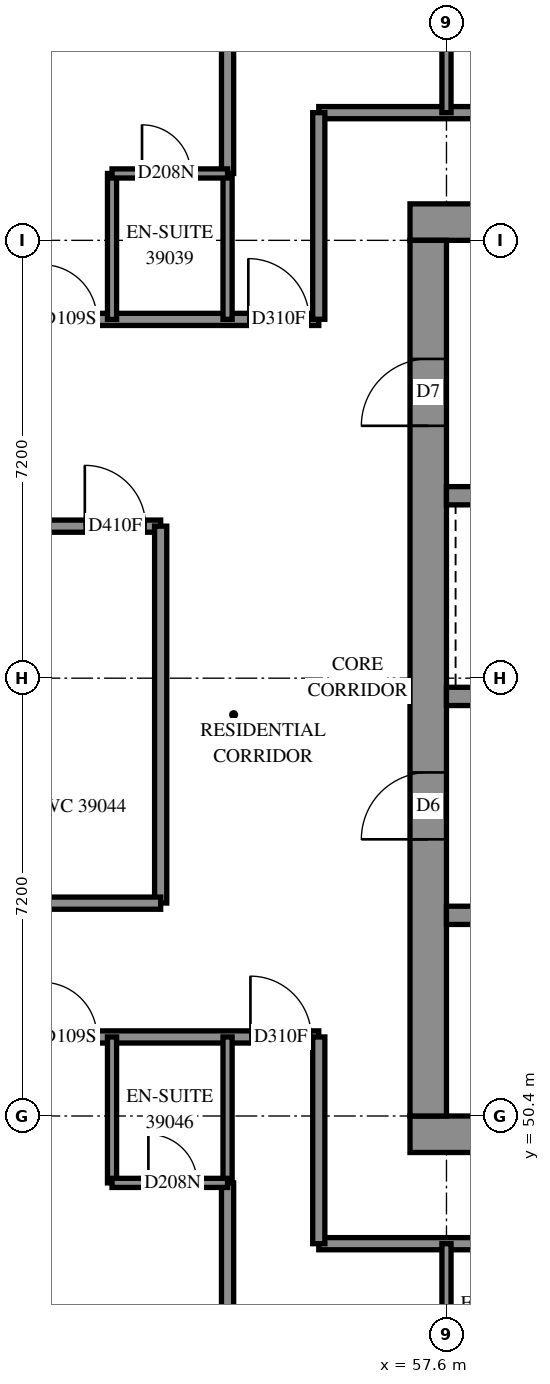
"""IFC4 building model, lengths in metres.
Left out: names, types, materials, properties, quantities, classifications, styles, units other than length and angle.
Written with IfcOpenShell. Run it as: python <this file> out.ifc"""

import sys

from ifc_helpers import new_model, si_unit, direction, frame, frame_2d, origin, place, context, subcontext, project, spatial, rectangle, extrude, element, fill, save


model = new_model("IFC4")
c1 = context("Model", 3, precision=1e-05, world=origin(), true_north=direction((0.0, 1.0)))
c2 = subcontext(c1, "Body", "Model", "MODEL_VIEW")
j1 = project(units=[si_unit("LENGTHUNIT", "METRE"), si_unit("PLANEANGLEUNIT", "RADIAN")], contexts=[c1])
p1 = place(None, origin())
s1 = spatial("IfcSite", under=j1, at=p1, CompositionType="ELEMENT")
p2 = place(p1, origin())
s2 = spatial("IfcBuilding", under=s1, at=p2, CompositionType="ELEMENT")
p3 = place(p2, frame((0.0, 0.0, 145.6)))
s3 = spatial("IfcBuildingStorey", under=s2, at=p3, CompositionType="ELEMENT", Elevation=145.6)
p4 = place(p3, frame((57.0, 50.1, -0.3), z_axis=(0.0, 0.0, 1.0), x_axis=(1.0, 0.0, 0.0)))
e1 = element("IfcWall", 1, at=p4, inside=s3, PredefinedType="SHEAR", context=c2, shape_type="SweptSolid", body=[
    extrude(rectangle(XDim=15.6, YDim=0.6, at=frame_2d((7.8, 0.0))), origin(), (0.0, 0.0, 1.0), 2.7),
])
p5 = place(p3, frame((57.0, 65.1, -0.3), z_axis=(0.0, 0.0, 1.0), x_axis=(1.0, 0.0, 0.0)))
e2 = element("IfcWall", 2, at=p5, inside=s3, PredefinedType="SHEAR", context=c2, shape_type="SweptSolid", body=[
    extrude(rectangle(XDim=15.6, YDim=0.6, at=frame_2d((7.8, 0.0))), origin(), (0.0, 0.0, 1.0), 2.7),
])
p6 = place(p5, frame((10.6, 0.0, 0.3)))
e3 = element("IfcOpeningElement", 3, at=p6, cuts=e2, PredefinedType="OPENING", context=c2, shape_type="SweptSolid", body=[
    extrude(rectangle(XDim=0.8, YDim=2.1, at=frame_2d((0.4, 1.05))), frame((0.0, 0.31, 0.0), z_axis=(0.0, -1.0, 0.0), x_axis=(1.0, 0.0, 0.0)), (0.0, 0.0, 1.0), 0.62),
])
p7 = place(p3, frame((57.3, 50.4, -0.3), z_axis=(0.0, 0.0, 1.0), x_axis=(0.0, 1.0, 0.0)))
e4 = element("IfcWall", 4, at=p7, inside=s3, PredefinedType="SHEAR", context=c2, shape_type="SweptSolid", body=[
    extrude(rectangle(XDim=14.4, YDim=0.6, at=frame_2d((7.2, 0.0))), origin(), (0.0, 0.0, 1.0), 2.7),
])
p8 = place(p7, frame((4.55, 0.0, 0.3)))
e5 = element("IfcOpeningElement", 5, at=p8, cuts=e4, PredefinedType="OPENING", context=c2, shape_type="SweptSolid", body=[
    extrude(rectangle(XDim=1.1, YDim=2.1, at=frame_2d((0.55, 1.05))), frame((0.0, 0.31, 0.0), z_axis=(0.0, -1.0, 0.0), x_axis=(1.0, 0.0, 0.0)), (0.0, 0.0, 1.0), 0.62),
])
p9 = place(p7, frame((11.35, 0.0, 0.3)))
e6 = element("IfcOpeningElement", 6, at=p9, cuts=e4, PredefinedType="OPENING", context=c2, shape_type="SweptSolid", body=[
    extrude(rectangle(XDim=1.1, YDim=2.1, at=frame_2d((0.55, 1.05))), frame((0.0, 0.31, 0.0), z_axis=(0.0, -1.0, 0.0), x_axis=(1.0, 0.0, 0.0)), (0.0, 0.0, 1.0), 0.62),
])
p10 = place(p3, frame((57.6, 53.7, 0.0), z_axis=(0.0, 0.0, 1.0), x_axis=(1.0, 0.0, 0.0)))
e7 = element("IfcWall", 7, at=p10, inside=s3, PredefinedType="SOLIDWALL", context=c2, shape_type="SweptSolid", body=[
    extrude(rectangle(XDim=14.4, YDim=0.3, at=frame_2d((7.2, 0.0))), origin(), (0.0, 0.0, 1.0), 3.1),
])
p11 = place(p10, frame((1.35, 0.0, 0.0)))
e8 = element("IfcOpeningElement", 8, at=p11, cuts=e7, PredefinedType="OPENING", context=c2, shape_type="SweptSolid", body=[
    extrude(rectangle(XDim=0.9, YDim=2.1, at=frame_2d((0.45, 1.05))), frame((0.0, 0.16, 0.0), z_axis=(0.0, -1.0, 0.0), x_axis=(1.0, 0.0, 0.0)), (0.0, 0.0, 1.0), 0.32),
])
p12 = place(p10, frame((4.95, 0.0, 0.0)))
e9 = element("IfcOpeningElement", 9, at=p12, cuts=e7, PredefinedType="OPENING", context=c2, shape_type="SweptSolid", body=[
    extrude(rectangle(XDim=0.9, YDim=2.1, at=frame_2d((0.45, 1.05))), frame((0.0, 0.16, 0.0), z_axis=(0.0, -1.0, 0.0), x_axis=(1.0, 0.0, 0.0)), (0.0, 0.0, 1.0), 0.32),
])
p13 = place(p10, frame((8.55, 0.0, 0.0)))
e10 = element("IfcOpeningElement", 10, at=p13, cuts=e7, PredefinedType="OPENING", context=c2, shape_type="SweptSolid", body=[
    extrude(rectangle(XDim=0.9, YDim=2.1, at=frame_2d((0.45, 1.05))), frame((0.0, 0.16, 0.0), z_axis=(0.0, -1.0, 0.0), x_axis=(1.0, 0.0, 0.0)), (0.0, 0.0, 1.0), 0.32),
])
p14 = place(p10, frame((12.05, 0.0, 0.0)))
e11 = element("IfcOpeningElement", 11, at=p14, cuts=e7, PredefinedType="OPENING", context=c2, shape_type="SweptSolid", body=[
    extrude(rectangle(XDim=1.1, YDim=2.1, at=frame_2d((0.55, 1.05))), frame((0.0, 0.16, 0.0), z_axis=(0.0, -1.0, 0.0), x_axis=(1.0, 0.0, 0.0)), (0.0, 0.0, 1.0), 0.32),
])
p15 = place(p3, frame((57.6, 57.3, 0.0), z_axis=(0.0, 0.0, 1.0), x_axis=(1.0, 0.0, 0.0)))
e12 = element("IfcWall", 12, at=p15, inside=s3, PredefinedType="SOLIDWALL", context=c2, shape_type="SweptSolid", body=[
    extrude(rectangle(XDim=14.4, YDim=0.3, at=frame_2d((7.2, 0.0))), origin(), (0.0, 0.0, 1.0), 3.1),
])
p16 = place(p15, frame((1.25, 0.0, 0.0)))
e13 = element("IfcOpeningElement", 13, at=p16, cuts=e12, PredefinedType="OPENING", context=c2, shape_type="SweptSolid", body=[
    extrude(rectangle(XDim=1.1, YDim=2.1, at=frame_2d((0.55, 1.05))), frame((0.0, 0.16, 0.0), z_axis=(0.0, -1.0, 0.0), x_axis=(1.0, 0.0, 0.0)), (0.0, 0.0, 1.0), 0.32),
])
p17 = place(p15, frame((4.85, 0.0, 0.0)))
e14 = element("IfcOpeningElement", 14, at=p17, cuts=e12, PredefinedType="OPENING", context=c2, shape_type="SweptSolid", body=[
    extrude(rectangle(XDim=1.1, YDim=2.1, at=frame_2d((0.55, 1.05))), frame((0.0, 0.16, 0.0), z_axis=(0.0, -1.0, 0.0), x_axis=(1.0, 0.0, 0.0)), (0.0, 0.0, 1.0), 0.32),
])
p18 = place(p15, frame((8.45, 0.0, 0.0)))
e15 = element("IfcOpeningElement", 15, at=p18, cuts=e12, PredefinedType="OPENING", context=c2, shape_type="SweptSolid", body=[
    extrude(rectangle(XDim=1.1, YDim=2.1, at=frame_2d((0.55, 1.05))), frame((0.0, 0.16, 0.0), z_axis=(0.0, -1.0, 0.0), x_axis=(1.0, 0.0, 0.0)), (0.0, 0.0, 1.0), 0.32),
])
p19 = place(p15, frame((12.05, 0.0, 0.0)))
e16 = element("IfcOpeningElement", 16, at=p19, cuts=e12, PredefinedType="OPENING", context=c2, shape_type="SweptSolid", body=[
    extrude(rectangle(XDim=1.1, YDim=2.1, at=frame_2d((0.55, 1.05))), frame((0.0, 0.16, 0.0), z_axis=(0.0, -1.0, 0.0), x_axis=(1.0, 0.0, 0.0)), (0.0, 0.0, 1.0), 0.32),
])
p20 = place(p3, frame((57.6, 60.6, 0.0), z_axis=(0.0, 0.0, 1.0), x_axis=(1.0, 0.0, 0.0)))
e17 = element("IfcWall", 17, at=p20, inside=s3, PredefinedType="SOLIDWALL", context=c2, shape_type="SweptSolid", body=[
    extrude(rectangle(XDim=7.2, YDim=0.3, at=frame_2d((3.6, 0.0))), origin(), (0.0, 0.0, 1.0), 3.1),
])
p21 = place(p3, frame((55.5, 48.3, 0.0), z_axis=(0.0, 0.0, 1.0), x_axis=(1.0, 0.0, 0.0)))
e18 = element("IfcWall", 18, at=p21, inside=s3, PredefinedType="PARTITIONING", context=c2, shape_type="SweptSolid", body=[
    extrude(rectangle(XDim=18.974, YDim=0.2, at=frame_2d((9.487, 0.0))), origin(), (0.0, 0.0, 1.0), 3.1),
])
p22 = place(p21, frame((4.4, 0.0, 0.0)))
e19 = element("IfcOpeningElement", 19, at=p22, cuts=e18, PredefinedType="OPENING", context=c2, shape_type="SweptSolid", body=[
    extrude(rectangle(XDim=0.9, YDim=2.1, at=frame_2d((0.45, 1.05))), frame((0.0, 0.11, 0.0), z_axis=(0.0, -1.0, 0.0), x_axis=(1.0, 0.0, 0.0)), (0.0, 0.0, 1.0), 0.22),
])
p23 = place(p21, frame((6.1, 0.0, 0.0)))
e20 = element("IfcOpeningElement", 20, at=p23, cuts=e18, PredefinedType="OPENING", context=c2, shape_type="SweptSolid", body=[
    extrude(rectangle(XDim=0.9, YDim=2.1, at=frame_2d((0.45, 1.05))), frame((0.0, 0.11, 0.0), z_axis=(0.0, -1.0, 0.0), x_axis=(1.0, 0.0, 0.0)), (0.0, 0.0, 1.0), 0.22),
])
p24 = place(p21, frame((13.162, 0.0, 0.0)))
e21 = element("IfcOpeningElement", 21, at=p24, cuts=e18, PredefinedType="OPENING", context=c2, shape_type="SweptSolid", body=[
    extrude(rectangle(XDim=1.0, YDim=2.1, at=frame_2d((0.5, 1.05))), frame((0.0, 0.11, 0.0), z_axis=(0.0, -1.0, 0.0), x_axis=(1.0, 0.0, 0.0)), (0.0, 0.0, 1.0), 0.22),
])
p25 = place(p3, frame((55.5, 66.9, 0.0), z_axis=(0.0, 0.0, 1.0), x_axis=(1.0, 0.0, 0.0)))
e22 = element("IfcWall", 22, at=p25, inside=s3, PredefinedType="PARTITIONING", context=c2, shape_type="SweptSolid", body=[
    extrude(rectangle(XDim=18.6, YDim=0.2, at=frame_2d((9.3, 0.0))), origin(), (0.0, 0.0, 1.0), 3.1),
])
p26 = place(p25, frame((4.4, 0.0, 0.0)))
e23 = element("IfcOpeningElement", 23, at=p26, cuts=e22, PredefinedType="OPENING", context=c2, shape_type="SweptSolid", body=[
    extrude(rectangle(XDim=0.9, YDim=2.1, at=frame_2d((0.45, 1.05))), frame((0.0, 0.11, 0.0), z_axis=(0.0, -1.0, 0.0), x_axis=(1.0, 0.0, 0.0)), (0.0, 0.0, 1.0), 0.22),
])
p27 = place(p25, frame((6.1, 0.0, 0.0)))
e24 = element("IfcOpeningElement", 24, at=p27, cuts=e22, PredefinedType="OPENING", context=c2, shape_type="SweptSolid", body=[
    extrude(rectangle(XDim=0.9, YDim=2.1, at=frame_2d((0.45, 1.05))), frame((0.0, 0.11, 0.0), z_axis=(0.0, -1.0, 0.0), x_axis=(1.0, 0.0, 0.0)), (0.0, 0.0, 1.0), 0.22),
])
p28 = place(p25, frame((11.65, 0.0, 0.0)))
e25 = element("IfcOpeningElement", 25, at=p28, cuts=e22, PredefinedType="OPENING", context=c2, shape_type="SweptSolid", body=[
    extrude(rectangle(XDim=0.9, YDim=2.1, at=frame_2d((0.45, 1.05))), frame((0.0, 0.11, 0.0), z_axis=(0.0, -1.0, 0.0), x_axis=(1.0, 0.0, 0.0)), (0.0, 0.0, 1.0), 0.22),
])
p29 = place(p25, frame((13.3, 0.0, 0.0)))
e26 = element("IfcOpeningElement", 26, at=p29, cuts=e22, PredefinedType="OPENING", context=c2, shape_type="SweptSolid", body=[
    extrude(rectangle(XDim=0.9, YDim=2.1, at=frame_2d((0.45, 1.05))), frame((0.0, 0.11, 0.0), z_axis=(0.0, -1.0, 0.0), x_axis=(1.0, 0.0, 0.0)), (0.0, 0.0, 1.0), 0.22),
])
p30 = place(p3, frame((36.0, 60.1, 0.0), z_axis=(0.0, 0.0, 1.0), x_axis=(1.0, 0.0, 0.0)))
e27 = element("IfcWall", 27, at=p30, inside=s3, PredefinedType="PARTITIONING", context=c2, shape_type="SweptSolid", body=[
    extrude(rectangle(XDim=16.9, YDim=0.2, at=frame_2d((8.45, 0.0))), origin(), (0.0, 0.0, 1.0), 3.1),
])
p31 = place(p30, frame((4.125, 0.0, 0.0)))
e28 = element("IfcOpeningElement", 28, at=p31, cuts=e27, PredefinedType="OPENING", context=c2, shape_type="SweptSolid", body=[
    extrude(rectangle(XDim=1.0, YDim=2.1, at=frame_2d((0.5, 1.05))), frame((0.0, 0.11, 0.0), z_axis=(0.0, -1.0, 0.0), x_axis=(1.0, 0.0, 0.0)), (0.0, 0.0, 1.0), 0.22),
])
p32 = place(p30, frame((7.6, 0.0, 0.0)))
e29 = element("IfcOpeningElement", 29, at=p32, cuts=e27, PredefinedType="OPENING", context=c2, shape_type="SweptSolid", body=[
    extrude(rectangle(XDim=0.9, YDim=2.1, at=frame_2d((0.45, 1.05))), frame((0.0, 0.11, 0.0), z_axis=(0.0, -1.0, 0.0), x_axis=(1.0, 0.0, 0.0)), (0.0, 0.0, 1.0), 0.22),
])
p33 = place(p30, frame((11.635, 0.0, 0.0)))
e30 = element("IfcOpeningElement", 30, at=p33, cuts=e27, PredefinedType="OPENING", context=c2, shape_type="SweptSolid", body=[
    extrude(rectangle(XDim=1.0, YDim=2.1, at=frame_2d((0.5, 1.05))), frame((0.0, 0.11, 0.0), z_axis=(0.0, -1.0, 0.0), x_axis=(1.0, 0.0, 0.0)), (0.0, 0.0, 1.0), 0.22),
])
p34 = place(p30, frame((15.652, 0.0, 0.0)))
e31 = element("IfcOpeningElement", 31, at=p34, cuts=e27, PredefinedType="OPENING", context=c2, shape_type="SweptSolid", body=[
    extrude(rectangle(XDim=1.0, YDim=2.1, at=frame_2d((0.5, 1.05))), frame((0.0, 0.11, 0.0), z_axis=(0.0, -1.0, 0.0), x_axis=(1.0, 0.0, 0.0)), (0.0, 0.0, 1.0), 0.22),
])
p35 = place(p3, frame((54.0, 42.345, 0.0), z_axis=(0.0, 0.0, 1.0), x_axis=(0.0, 1.0, 0.0)))
e32 = element("IfcWall", 32, at=p35, inside=s3, PredefinedType="PARTITIONING", context=c2, shape_type="SweptSolid", body=[
    extrude(rectangle(XDim=6.955, YDim=0.2, at=frame_2d((3.477, 0.0))), origin(), (0.0, 0.0, 1.0), 3.1),
])
p36 = place(p3, frame((54.0, 65.9, 0.0), z_axis=(0.0, 0.0, 1.0), x_axis=(0.0, 1.0, 0.0)))
e33 = element("IfcWall", 33, at=p36, inside=s3, PredefinedType="PARTITIONING", context=c2, shape_type="SweptSolid", body=[
    extrude(rectangle(XDim=6.843, YDim=0.2, at=frame_2d((3.422, 0.0))), origin(), (0.0, 0.0, 1.0), 3.1),
])
p37 = place(p3, frame((52.9, 53.902, 0.0), z_axis=(0.0, 0.0, 1.0), x_axis=(0.0, 1.0, 0.0)))
e34 = element("IfcWall", 34, at=p37, inside=s3, PredefinedType="PARTITIONING", context=c2, shape_type="SweptSolid", body=[
    extrude(rectangle(XDim=6.198, YDim=0.2, at=frame_2d((3.099, 0.0))), origin(), (0.0, 0.0, 1.0), 3.1),
])
p38 = place(p3, frame((50.4, 51.7, 0.0), z_axis=(0.0, 0.0, 1.0), x_axis=(1.0, 0.0, 0.0)))
e35 = element("IfcWall", 35, at=p38, inside=s3, PredefinedType="PARTITIONING", context=c2, shape_type="SweptSolid", body=[
    extrude(rectangle(XDim=5.1, YDim=0.2, at=frame_2d((2.55, 0.0))), origin(), (0.0, 0.0, 1.0), 3.1),
])
p39 = place(p38, frame((0.552, 0.0, 0.0)))
e36 = element("IfcOpeningElement", 36, at=p39, cuts=e35, PredefinedType="OPENING", context=c2, shape_type="SweptSolid", body=[
    extrude(rectangle(XDim=0.9, YDim=2.1, at=frame_2d((0.45, 1.05))), frame((0.0, 0.11, 0.0), z_axis=(0.0, -1.0, 0.0), x_axis=(1.0, 0.0, 0.0)), (0.0, 0.0, 1.0), 0.22),
])
p40 = place(p38, frame((3.976, 0.0, 0.0)))
e37 = element("IfcOpeningElement", 37, at=p40, cuts=e35, PredefinedType="OPENING", context=c2, shape_type="SweptSolid", body=[
    extrude(rectangle(XDim=1.0, YDim=2.1, at=frame_2d((0.5, 1.05))), frame((0.0, 0.11, 0.0), z_axis=(0.0, -1.0, 0.0), x_axis=(1.0, 0.0, 0.0)), (0.0, 0.0, 1.0), 0.22),
])
p41 = place(p3, frame((50.4, 63.5, 0.0), z_axis=(0.0, 0.0, 1.0), x_axis=(1.0, 0.0, 0.0)))
e38 = element("IfcWall", 38, at=p41, inside=s3, PredefinedType="PARTITIONING", context=c2, shape_type="SweptSolid", body=[
    extrude(rectangle(XDim=5.1, YDim=0.2, at=frame_2d((2.55, 0.0))), origin(), (0.0, 0.0, 1.0), 3.1),
])
p42 = place(p41, frame((0.552, 0.0, 0.0)))
e39 = element("IfcOpeningElement", 39, at=p42, cuts=e38, PredefinedType="OPENING", context=c2, shape_type="SweptSolid", body=[
    extrude(rectangle(XDim=0.9, YDim=2.1, at=frame_2d((0.45, 1.05))), frame((0.0, 0.11, 0.0), z_axis=(0.0, -1.0, 0.0), x_axis=(1.0, 0.0, 0.0)), (0.0, 0.0, 1.0), 0.22),
])
p43 = place(p41, frame((3.941, 0.0, 0.0)))
e40 = element("IfcOpeningElement", 40, at=p43, cuts=e38, PredefinedType="OPENING", context=c2, shape_type="SweptSolid", body=[
    extrude(rectangle(XDim=1.0, YDim=2.1, at=frame_2d((0.5, 1.05))), frame((0.0, 0.11, 0.0), z_axis=(0.0, -1.0, 0.0), x_axis=(1.0, 0.0, 0.0)), (0.0, 0.0, 1.0), 0.22),
])
p44 = place(p3, frame((55.5, 48.3, 0.0), z_axis=(0.0, 0.0, 1.0), x_axis=(0.0, 1.0, 0.0)))
e41 = element("IfcWall", 41, at=p44, inside=s3, PredefinedType="PARTITIONING", context=c2, shape_type="SweptSolid", body=[
    extrude(rectangle(XDim=3.4, YDim=0.2, at=frame_2d((1.7, 0.0))), origin(), (0.0, 0.0, 1.0), 3.1),
])
p45 = place(p3, frame((55.5, 63.502, 0.0), z_axis=(0.0, 0.0, 1.0), x_axis=(0.0, 1.0, 0.0)))
e42 = element("IfcWall", 42, at=p45, inside=s3, PredefinedType="PARTITIONING", context=c2, shape_type="SweptSolid", body=[
    extrude(rectangle(XDim=3.398, YDim=0.2, at=frame_2d((1.699, 0.0))), origin(), (0.0, 0.0, 1.0), 3.1),
])
p46 = place(p3, frame((50.4, 53.9, 0.0), z_axis=(0.0, 0.0, 1.0), x_axis=(1.0, 0.0, 0.0)))
e43 = element("IfcWall", 43, at=p46, inside=s3, PredefinedType="PARTITIONING", context=c2, shape_type="SweptSolid", body=[
    extrude(rectangle(XDim=2.5, YDim=0.2, at=frame_2d((1.25, 0.0))), origin(), (0.0, 0.0, 1.0), 3.1),
])
for number, where, z_axis, x_axis in (
    (44, (52.1, 49.3, 0.0), (0.0, 0.0, 1.0), (0.0, 1.0, 0.0)),
    (45, (52.1, 63.5, 0.0), (0.0, 0.0, 1.0), (0.0, 1.0, 0.0)),
    (46, (54.0, 49.3, 0.0), (0.0, 0.0, 1.0), (0.0, 1.0, 0.0)),
    (47, (54.0, 63.5, 0.0), (0.0, 0.0, 1.0), (0.0, 1.0, 0.0)),
    (48, (57.6, 45.9, 0.0), (0.0, 0.0, 1.0), (0.0, 1.0, 0.0)),
    (49, (57.6, 66.9, 0.0), (0.0, 0.0, 1.0), (0.0, 1.0, 0.0)),
):
    element("IfcWall", number, at=place(p3, frame(where, z_axis=z_axis, x_axis=x_axis)), inside=s3, PredefinedType="PARTITIONING", context=c2, shape_type="SweptSolid", body=[
        extrude(rectangle(XDim=2.4, YDim=0.15, at=frame_2d((1.2, 0.0))), origin(), (0.0, 0.0, 1.0), 3.1),
    ])
p47 = place(p3, frame((52.1, 49.3, 0.0), z_axis=(0.0, 0.0, 1.0), x_axis=(1.0, 0.0, 0.0)))
e50 = element("IfcWall", 50, at=p47, inside=s3, PredefinedType="PARTITIONING", context=c2, shape_type="SweptSolid", body=[
    extrude(rectangle(XDim=1.9, YDim=0.15, at=frame_2d((0.95, 0.0))), origin(), (0.0, 0.0, 1.0), 3.1),
])
p48 = place(p47, frame((0.598, 0.0, 0.0)))
e51 = element("IfcOpeningElement", 51, at=p48, cuts=e50, PredefinedType="OPENING", context=c2, shape_type="SweptSolid", body=[
    extrude(rectangle(XDim=0.8, YDim=2.1, at=frame_2d((0.4, 1.05))), frame((0.0, 0.085, 0.0), z_axis=(0.0, -1.0, 0.0), x_axis=(1.0, 0.0, 0.0)), (0.0, 0.0, 1.0), 0.17),
])
p49 = place(p3, frame((52.1, 65.9, 0.0), z_axis=(0.0, 0.0, 1.0), x_axis=(1.0, 0.0, 0.0)))
e52 = element("IfcWall", 52, at=p49, inside=s3, PredefinedType="PARTITIONING", context=c2, shape_type="SweptSolid", body=[
    extrude(rectangle(XDim=1.9, YDim=0.15, at=frame_2d((0.95, 0.0))), origin(), (0.0, 0.0, 1.0), 3.1),
])
p50 = place(p49, frame((0.493, 0.0, 0.0)))
e53 = element("IfcOpeningElement", 53, at=p50, cuts=e52, PredefinedType="OPENING", context=c2, shape_type="SweptSolid", body=[
    extrude(rectangle(XDim=0.8, YDim=2.1, at=frame_2d((0.4, 1.05))), frame((0.0, 0.085, 0.0), z_axis=(0.0, -1.0, 0.0), x_axis=(1.0, 0.0, 0.0)), (0.0, 0.0, 1.0), 0.17),
])
p51 = place(p8, origin())
e54 = element("IfcDoor", 54, at=p51, inside=s3, OperationType="DOUBLE_DOOR_SINGLE_SWING", PredefinedType="DOOR", context=c2, shape_type="SweptSolid", body=[
    extrude(rectangle(XDim=1.1, YDim=2.1, at=frame_2d((0.55, 1.05))), frame((0.0, 0.025, 0.0), z_axis=(0.0, -1.0, 0.0), x_axis=(1.0, 0.0, 0.0)), (0.0, 0.0, 1.0), 0.05),
])
fill(e5, e54)
p52 = place(p9, origin())
e55 = element("IfcDoor", 55, at=p52, inside=s3, OperationType="SINGLE_SWING_LEFT", PredefinedType="DOOR", context=c2, shape_type="SweptSolid", body=[
    extrude(rectangle(XDim=1.1, YDim=2.1, at=frame_2d((0.55, 1.05))), frame((0.0, 0.025, 0.0), z_axis=(0.0, -1.0, 0.0), x_axis=(1.0, 0.0, 0.0)), (0.0, 0.0, 1.0), 0.05),
])
fill(e6, e55)
p53 = place(p42, origin())
e56 = element("IfcDoor", 56, at=p53, inside=s3, OperationType="SINGLE_SWING_RIGHT", PredefinedType="DOOR", context=c2, shape_type="SweptSolid", body=[
    extrude(rectangle(XDim=0.9, YDim=2.1, at=frame_2d((0.45, 1.05))), frame((0.0, 0.025, 0.0), z_axis=(0.0, -1.0, 0.0), x_axis=(1.0, 0.0, 0.0)), (0.0, 0.0, 1.0), 0.05),
])
fill(e39, e56)
p54 = place(p50, origin())
e57 = element("IfcDoor", 57, at=p54, inside=s3, OperationType="SINGLE_SWING_RIGHT", PredefinedType="DOOR", context=c2, shape_type="SweptSolid", body=[
    extrude(rectangle(XDim=0.8, YDim=2.1, at=frame_2d((0.4, 1.05))), frame((0.0, 0.025, 0.0), z_axis=(0.0, -1.0, 0.0), x_axis=(1.0, 0.0, 0.0)), (0.0, 0.0, 1.0), 0.05),
])
fill(e53, e57)
p55 = place(p43, origin())
e58 = element("IfcDoor", 58, at=p55, inside=s3, OperationType="SINGLE_SWING_LEFT", PredefinedType="DOOR", context=c2, shape_type="SweptSolid", body=[
    extrude(rectangle(XDim=1.0, YDim=2.1, at=frame_2d((0.5, 1.05))), frame((0.0, 0.025, 0.0), z_axis=(0.0, -1.0, 0.0), x_axis=(1.0, 0.0, 0.0)), (0.0, 0.0, 1.0), 0.05),
])
fill(e40, e58)
p56 = place(p34, origin())
e59 = element("IfcDoor", 59, at=p56, inside=s3, OperationType="SINGLE_SWING_LEFT", PredefinedType="DOOR", context=c2, shape_type="SweptSolid", body=[
    extrude(rectangle(XDim=1.0, YDim=2.1, at=frame_2d((0.5, 1.05))), frame((0.0, 0.025, 0.0), z_axis=(0.0, -1.0, 0.0), x_axis=(1.0, 0.0, 0.0)), (0.0, 0.0, 1.0), 0.05),
])
fill(e31, e59)
p57 = place(p39, origin())
e60 = element("IfcDoor", 60, at=p57, inside=s3, OperationType="SINGLE_SWING_LEFT", PredefinedType="DOOR", context=c2, shape_type="SweptSolid", body=[
    extrude(rectangle(XDim=0.9, YDim=2.1, at=frame_2d((0.45, 1.05))), frame((0.0, 0.025, 0.0), z_axis=(0.0, -1.0, 0.0), x_axis=(1.0, 0.0, 0.0)), (0.0, 0.0, 1.0), 0.05),
])
fill(e36, e60)
p58 = place(p48, origin())
e61 = element("IfcDoor", 61, at=p58, inside=s3, OperationType="SINGLE_SWING_RIGHT", PredefinedType="DOOR", context=c2, shape_type="SweptSolid", body=[
    extrude(rectangle(XDim=0.8, YDim=2.1, at=frame_2d((0.4, 1.05))), frame((0.0, 0.025, 0.0), z_axis=(0.0, -1.0, 0.0), x_axis=(1.0, 0.0, 0.0)), (0.0, 0.0, 1.0), 0.05),
])
fill(e51, e61)
p59 = place(p40, origin())
e62 = element("IfcDoor", 62, at=p59, inside=s3, OperationType="SINGLE_SWING_RIGHT", PredefinedType="DOOR", context=c2, shape_type="SweptSolid", body=[
    extrude(rectangle(XDim=1.0, YDim=2.1, at=frame_2d((0.5, 1.05))), frame((0.0, 0.025, 0.0), z_axis=(0.0, -1.0, 0.0), x_axis=(1.0, 0.0, 0.0)), (0.0, 0.0, 1.0), 0.05),
])
fill(e37, e62)
save(model, sys.argv[1])
